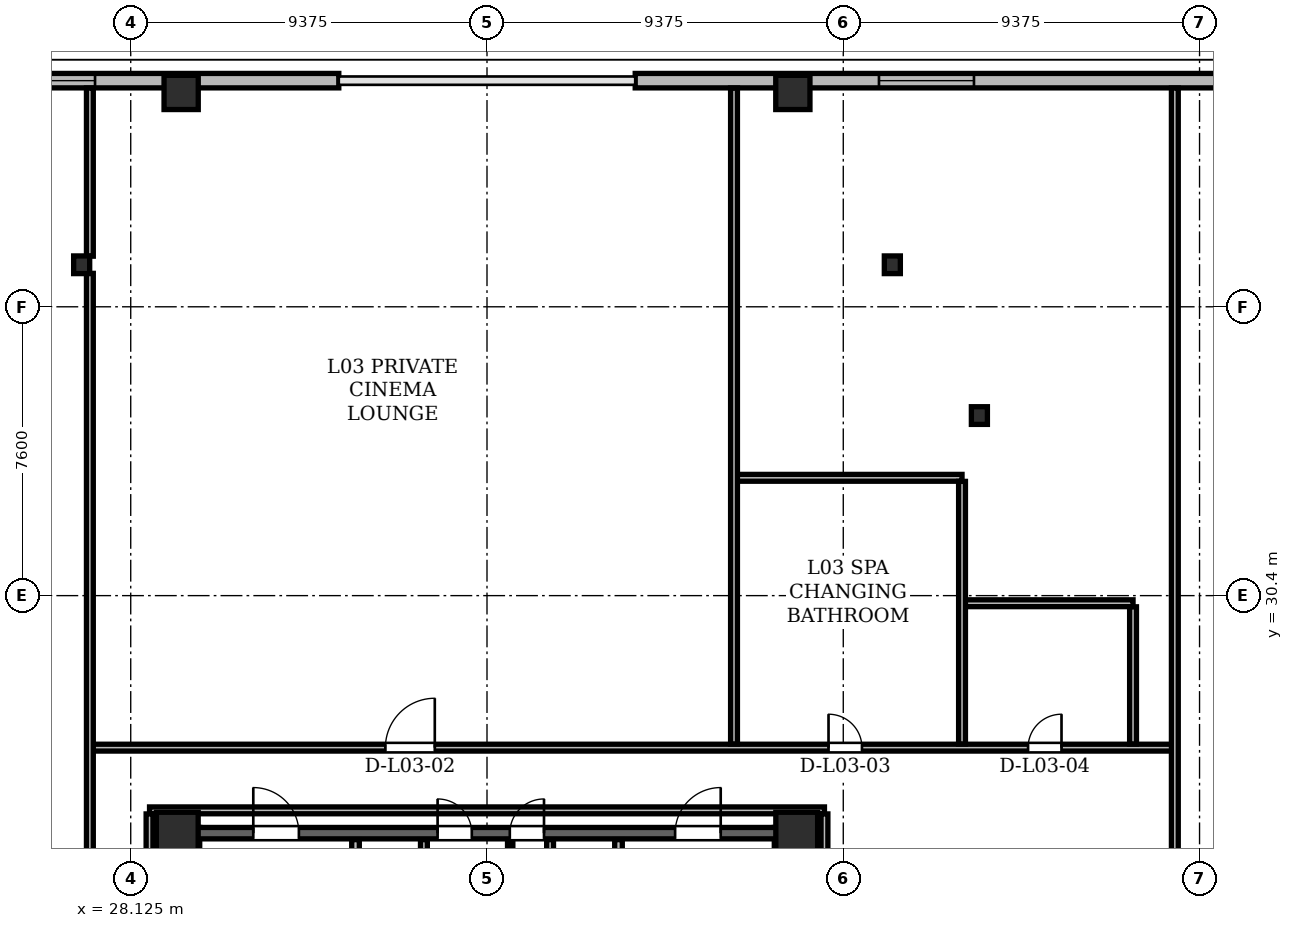
"""IFC4 building model, lengths in metres.
Left out: names, types, materials, properties, quantities, classifications, styles, units other than length and angle.
Written with IfcOpenShell. Run it as: python <this file> out.ifc"""

import sys

from ifc_helpers import new_model, si_unit, direction, frame, frame_2d, origin, origin_2d, place, context, subcontext, project, spatial, rectangle, hollow_rectangle, i_section, extrude, element, fill, save


model = new_model("IFC4")
c1 = context("Model", 3, precision=1e-05, world=origin(), true_north=direction((0.0, 1.0)))
c2 = subcontext(c1, "Body", "Model", "MODEL_VIEW")
j1 = project(units=[si_unit("LENGTHUNIT", "METRE"), si_unit("PLANEANGLEUNIT", "RADIAN")], contexts=[c1])
p1 = place(None, origin())
s1 = spatial("IfcSite", under=j1, at=p1, CompositionType="ELEMENT")
p2 = place(p1, origin())
s2 = spatial("IfcBuilding", under=s1, at=p2, CompositionType="ELEMENT")
p3 = place(p2, frame((0.0, 0.0, 14.1)))
s3 = spatial("IfcBuildingStorey", under=s2, at=p3, CompositionType="ELEMENT", Elevation=14.1)
for number, where, z_axis, x_axis in (
    (1, (45.65, 24.15, 0.0), (0.0, 0.0, 1.0), (1.0, 0.0, 0.0)),
    (2, (29.35, 24.15, 0.0), (0.0, 0.0, 1.0), (1.0, 0.0, 0.0)),
):
    element("IfcColumn", number, at=place(p3, frame(where, z_axis=z_axis, x_axis=x_axis)), inside=s3, PredefinedType="COLUMN", context=c2, shape_type="SweptSolid", body=[
        extrude(hollow_rectangle(XDim=1.1, YDim=1.1, WallThickness=0.09, at=origin_2d()), origin(), (0.0, 0.0, 1.0), 4.2),
    ])
for number, where, z_axis, x_axis in (
    (3, (45.548, 43.64, 0.004), (0.0, 0.0, 1.0), (1.0, 0.0, 0.0)),
    (4, (29.452, 43.64, 0.004), (0.0, 0.0, 1.0), (1.0, 0.0, 0.0)),
):
    element("IfcColumn", number, at=place(p3, frame(where, z_axis=z_axis, x_axis=x_axis)), inside=s3, PredefinedType="COLUMN", context=c2, shape_type="SweptSolid", body=[
        extrude(hollow_rectangle(XDim=0.9, YDim=0.9, WallThickness=0.075, at=origin_2d()), origin(), (0.0, 0.0, 1.0), 4.191),
    ])
for number, where, z_axis, x_axis in (
    (5, (50.457, 35.138, 0.004), (0.0, 0.0, 1.0), (1.0, 0.0, 0.0)),
    (6, (48.166, 39.106, 0.004), (0.0, 0.0, 1.0), (1.0, 0.0, 0.0)),
    (7, (26.834, 39.106, 0.004), (0.0, 0.0, 1.0), (1.0, 0.0, 0.0)),
):
    element("IfcColumn", number, at=place(p3, frame(where, z_axis=z_axis, x_axis=x_axis)), inside=s3, PredefinedType="COLUMN", context=c2, shape_type="SweptSolid", body=[
        extrude(i_section(OverallWidth=0.422, OverallDepth=0.465, WebThickness=0.045, FlangeThickness=0.072, at=origin_2d()), origin(), (0.0, 0.0, 1.0), 4.191),
    ])
for number, where, z_axis, x_axis in (
    (8, (29.64, 11.0, 0.0), (0.0, 0.0, 1.0), (0.0, 1.0, 0.0)),
    (9, (45.36, 11.0, 0.0), (0.0, 0.0, 1.0), (0.0, 1.0, 0.0)),
):
    element("IfcWall", number, at=place(p3, frame(where, z_axis=z_axis, x_axis=x_axis)), inside=s3, PredefinedType="SHEAR", context=c2, shape_type="SweptSolid", body=[
        extrude(rectangle(XDim=13.3, YDim=0.6, at=frame_2d((6.65, 0.0))), origin(), (0.0, 0.0, 1.0), 3.92),
    ])
p4 = place(p3, frame((29.65, 24.15, 0.0), z_axis=(0.0, 0.0, 1.0), x_axis=(1.0, 0.0, 0.0)))
e10 = element("IfcWall", 10, at=p4, inside=s3, PredefinedType="SHEAR", context=c2, shape_type="SweptSolid", body=[
    extrude(rectangle(XDim=15.7, YDim=0.3, at=frame_2d((7.85, 0.0))), origin(), (0.0, 0.0, 1.0), 3.92),
])
p5 = place(p4, frame((1.7, 0.0, 0.0)))
e11 = element("IfcOpeningElement", 11, at=p5, cuts=e10, PredefinedType="OPENING", context=c2, shape_type="SweptSolid", body=[
    extrude(rectangle(XDim=1.2, YDim=2.2, at=frame_2d((0.6, 1.1))), frame((0.0, 0.15, 0.0), z_axis=(0.0, -1.0, 0.0), x_axis=(1.0, 0.0, 0.0)), (0.0, 0.0, 1.0), 0.3),
])
p6 = place(p4, frame((12.8, 0.0, 0.0)))
e12 = element("IfcOpeningElement", 12, at=p6, cuts=e10, PredefinedType="OPENING", context=c2, shape_type="SweptSolid", body=[
    extrude(rectangle(XDim=1.2, YDim=2.2, at=frame_2d((0.6, 1.1))), frame((0.0, 0.15, 0.0), z_axis=(0.0, -1.0, 0.0), x_axis=(1.0, 0.0, 0.0)), (0.0, 0.0, 1.0), 0.3),
])
p7 = place(p4, frame((6.55, 0.0, 0.0)))
e13 = element("IfcOpeningElement", 13, at=p7, cuts=e10, PredefinedType="OPENING", context=c2, shape_type="SweptSolid", body=[
    extrude(rectangle(XDim=0.9, YDim=2.05, at=frame_2d((0.45, 1.025))), frame((0.0, 0.15, 0.0), z_axis=(0.0, -1.0, 0.0), x_axis=(1.0, 0.0, 0.0)), (0.0, 0.0, 1.0), 0.3),
])
p8 = place(p4, frame((8.45, 0.0, 0.0)))
e14 = element("IfcOpeningElement", 14, at=p8, cuts=e10, PredefinedType="OPENING", context=c2, shape_type="SweptSolid", body=[
    extrude(rectangle(XDim=0.9, YDim=2.05, at=frame_2d((0.45, 1.025))), frame((0.0, 0.15, 0.0), z_axis=(0.0, -1.0, 0.0), x_axis=(1.0, 0.0, 0.0)), (0.0, 0.0, 1.0), 0.3),
])
p9 = place(p3, frame((68.772, 43.95, 0.0), z_axis=(0.0, 0.0, 1.0), x_axis=(-1.0, 0.0, 0.0)))
e15 = element("IfcWall", 15, at=p9, inside=s3, PredefinedType="SOLIDWALL", context=c2, shape_type="SweptSolid", body=[
    extrude(rectangle(XDim=27.372, YDim=0.38, at=frame_2d((13.686, 0.0))), origin(), (0.0, 0.0, 1.0), 3.054),
])
p10 = place(p9, frame((6.414, 0.0, 0.85)))
e16 = element("IfcOpeningElement", 16, at=p10, cuts=e15, PredefinedType="OPENING", context=c2, shape_type="SweptSolid", body=[
    extrude(rectangle(XDim=2.5, YDim=2.034, at=frame_2d((1.25, 1.017))), frame((0.0, 0.19, 0.0), z_axis=(0.0, -1.0, 0.0), x_axis=(1.0, 0.0, 0.0)), (0.0, 0.0, 1.0), 0.38),
])
p11 = place(p9, frame((18.458, 0.0, 0.85)))
e17 = element("IfcOpeningElement", 17, at=p11, cuts=e15, PredefinedType="OPENING", context=c2, shape_type="SweptSolid", body=[
    extrude(rectangle(XDim=2.5, YDim=2.034, at=frame_2d((1.25, 1.017))), frame((0.0, 0.19, 0.0), z_axis=(0.0, -1.0, 0.0), x_axis=(1.0, 0.0, 0.0)), (0.0, 0.0, 1.0), 0.38),
])
p12 = place(p3, frame((33.6, 43.95, 0.0), z_axis=(0.0, 0.0, 1.0), x_axis=(-1.0, 0.0, 0.0)))
e18 = element("IfcWall", 18, at=p12, inside=s3, PredefinedType="SOLIDWALL", context=c2, shape_type="SweptSolid", body=[
    extrude(rectangle(XDim=27.372, YDim=0.38, at=frame_2d((13.686, 0.0))), origin(), (0.0, 0.0, 1.0), 3.054),
])
p13 = place(p12, frame((6.414, 0.0, 0.85)))
e19 = element("IfcOpeningElement", 19, at=p13, cuts=e18, PredefinedType="OPENING", context=c2, shape_type="SweptSolid", body=[
    extrude(rectangle(XDim=2.5, YDim=2.034, at=frame_2d((1.25, 1.017))), frame((0.0, 0.19, 0.0), z_axis=(0.0, -1.0, 0.0), x_axis=(1.0, 0.0, 0.0)), (0.0, 0.0, 1.0), 0.38),
])
p14 = place(p12, frame((18.458, 0.0, 0.85)))
e20 = element("IfcOpeningElement", 20, at=p14, cuts=e18, PredefinedType="OPENING", context=c2, shape_type="SweptSolid", body=[
    extrude(rectangle(XDim=2.5, YDim=2.034, at=frame_2d((1.25, 1.017))), frame((0.0, 0.19, 0.0), z_axis=(0.0, -1.0, 0.0), x_axis=(1.0, 0.0, 0.0)), (0.0, 0.0, 1.0), 0.38),
])
p15 = place(p3, frame((34.04, 19.48, 0.0), z_axis=(0.0, 0.0, 1.0), x_axis=(0.0, 1.0, 0.0)))
e21 = element("IfcWall", 21, at=p15, inside=s3, PredefinedType="PARTITIONING", context=c2, shape_type="SweptSolid", body=[
    extrude(rectangle(XDim=4.5, YDim=0.2, at=frame_2d((2.25, 0.0))), origin(), (0.0, 0.0, 1.0), 2.96),
])
p16 = place(p15, frame((2.12, 0.0, 0.0)))
e22 = element("IfcOpeningElement", 22, at=p16, cuts=e21, PredefinedType="OPENING", context=c2, shape_type="SweptSolid", body=[
    extrude(rectangle(XDim=1.1, YDim=2.2, at=frame_2d((0.55, 1.1))), frame((0.0, 0.1, 0.0), z_axis=(0.0, -1.0, 0.0), x_axis=(1.0, 0.0, 0.0)), (0.0, 0.0, 1.0), 0.2),
])
p17 = place(p3, frame((35.84, 20.96, 0.0), z_axis=(0.0, 0.0, 1.0), x_axis=(0.0, 1.0, 0.0)))
e23 = element("IfcWall", 23, at=p17, inside=s3, PredefinedType="PARTITIONING", context=c2, shape_type="SweptSolid", body=[
    extrude(rectangle(XDim=3.02, YDim=0.18, at=frame_2d((1.51, 0.0))), origin(), (0.0, 0.0, 1.0), 2.96),
])
p18 = place(p3, frame((40.96, 19.48, 0.0), z_axis=(0.0, 0.0, 1.0), x_axis=(0.0, 1.0, 0.0)))
e24 = element("IfcWall", 24, at=p18, inside=s3, PredefinedType="PARTITIONING", context=c2, shape_type="SweptSolid", body=[
    extrude(rectangle(XDim=4.5, YDim=0.2, at=frame_2d((2.25, 0.0))), origin(), (0.0, 0.0, 1.0), 2.96),
])
p19 = place(p18, frame((2.12, 0.0, 0.0)))
e25 = element("IfcOpeningElement", 25, at=p19, cuts=e24, PredefinedType="OPENING", context=c2, shape_type="SweptSolid", body=[
    extrude(rectangle(XDim=1.1, YDim=2.2, at=frame_2d((0.55, 1.1))), frame((0.0, 0.1, 0.0), z_axis=(0.0, -1.0, 0.0), x_axis=(1.0, 0.0, 0.0)), (0.0, 0.0, 1.0), 0.2),
])
p20 = place(p3, frame((39.16, 20.96, 0.0), z_axis=(0.0, 0.0, 1.0), x_axis=(0.0, 1.0, 0.0)))
e26 = element("IfcWall", 26, at=p20, inside=s3, PredefinedType="PARTITIONING", context=c2, shape_type="SweptSolid", body=[
    extrude(rectangle(XDim=3.02, YDim=0.18, at=frame_2d((1.51, 0.0))), origin(), (0.0, 0.0, 1.0), 2.96),
])
p21 = place(p3, frame((38.11, 21.06, 0.0), z_axis=(0.0, 0.0, 1.0), x_axis=(0.0, 1.0, 0.0)))
e27 = element("IfcWall", 27, at=p21, inside=s3, PredefinedType="PARTITIONING", context=c2, shape_type="SweptSolid", body=[
    extrude(rectangle(XDim=2.92, YDim=0.14, at=frame_2d((1.46, 0.0))), origin(), (0.0, 0.0, 1.0), 2.96),
])
p22 = place(p3, frame((28.62, 24.75, 0.0), z_axis=(0.0, 0.0, 1.0), x_axis=(1.0, 0.0, 0.0)))
e28 = element("IfcWall", 28, at=p22, inside=s3, PredefinedType="PARTITIONING", context=c2, shape_type="SweptSolid", body=[
    extrude(rectangle(XDim=17.76, YDim=0.18, at=frame_2d((8.88, 0.0))), origin(), (0.0, 0.0, 1.0), 2.983),
])
p23 = place(p3, frame((27.05, 26.4, 0.0), z_axis=(0.0, 0.0, 1.0), x_axis=(1.0, 0.0, 0.0)))
e29 = element("IfcWall", 29, at=p23, inside=s3, PredefinedType="PARTITIONING", context=c2, shape_type="SweptSolid", body=[
    extrude(rectangle(XDim=28.55, YDim=0.18, at=frame_2d((14.275, 0.0))), origin(), (0.0, 0.0, 1.0), 2.983),
])
p24 = place(p23, frame((7.776, 0.0, 0.0)))
e30 = element("IfcOpeningElement", 30, at=p24, cuts=e29, PredefinedType="OPENING", context=c2, shape_type="SweptSolid", body=[
    extrude(rectangle(XDim=1.3, YDim=2.2, at=frame_2d((0.65, 1.1))), frame((0.0, 0.09, 0.0), z_axis=(0.0, -1.0, 0.0), x_axis=(1.0, 0.0, 0.0)), (0.0, 0.0, 1.0), 0.18),
])
p25 = place(p23, frame((19.437, 0.0, 0.0)))
e31 = element("IfcOpeningElement", 31, at=p25, cuts=e29, PredefinedType="OPENING", context=c2, shape_type="SweptSolid", body=[
    extrude(rectangle(XDim=0.88, YDim=2.08, at=frame_2d((0.44, 1.04))), frame((0.0, 0.09, 0.0), z_axis=(0.0, -1.0, 0.0), x_axis=(1.0, 0.0, 0.0)), (0.0, 0.0, 1.0), 0.18),
])
p26 = place(p23, frame((24.688, 0.0, 0.0)))
e32 = element("IfcOpeningElement", 32, at=p26, cuts=e29, PredefinedType="OPENING", context=c2, shape_type="SweptSolid", body=[
    extrude(rectangle(XDim=0.88, YDim=2.08, at=frame_2d((0.44, 1.04))), frame((0.0, 0.09, 0.0), z_axis=(0.0, -1.0, 0.0), x_axis=(1.0, 0.0, 0.0)), (0.0, 0.0, 1.0), 0.18),
])
p27 = place(p3, frame((50.0, 30.2, 0.0), z_axis=(0.0, 0.0, 1.0), x_axis=(1.0, 0.0, 0.0)))
e33 = element("IfcWall", 33, at=p27, inside=s3, PredefinedType="PARTITIONING", context=c2, shape_type="SweptSolid", body=[
    extrude(rectangle(XDim=4.5, YDim=0.18, at=frame_2d((2.25, 0.0))), origin(), (0.0, 0.0, 1.0), 3.054),
])
p28 = place(p3, frame((44.0, 33.5, 0.0), z_axis=(0.0, 0.0, 1.0), x_axis=(1.0, 0.0, 0.0)))
e34 = element("IfcWall", 34, at=p28, inside=s3, PredefinedType="PARTITIONING", context=c2, shape_type="SweptSolid", body=[
    extrude(rectangle(XDim=6.0, YDim=0.18, at=frame_2d((3.0, 0.0))), origin(), (0.0, 0.0, 1.0), 2.983),
])
p29 = place(p3, frame((27.05, 10.494, 0.0), z_axis=(0.0, 0.0, 1.0), x_axis=(0.0, 1.0, 0.0)))
e35 = element("IfcWall", 35, at=p29, inside=s3, PredefinedType="PARTITIONING", context=c2, shape_type="SweptSolid", body=[
    extrude(rectangle(XDim=28.386, YDim=0.18, at=frame_2d((14.193, 0.0))), origin(), (0.0, 0.0, 1.0), 2.983),
])
p30 = place(p29, frame((5.985, 0.0, 0.0)))
e36 = element("IfcOpeningElement", 36, at=p30, cuts=e35, PredefinedType="OPENING", context=c2, shape_type="SweptSolid", body=[
    extrude(rectangle(XDim=1.3, YDim=2.2, at=frame_2d((0.65, 1.1))), frame((0.0, 0.09, 0.0), z_axis=(0.0, -1.0, 0.0), x_axis=(1.0, 0.0, 0.0)), (0.0, 0.0, 1.0), 0.18),
])
p31 = place(p3, frame((27.05, 39.332, 0.0), z_axis=(0.0, 0.0, 1.0), x_axis=(0.0, 1.0, 0.0)))
e37 = element("IfcWall", 37, at=p31, inside=s3, PredefinedType="PARTITIONING", context=c2, shape_type="SweptSolid", body=[
    extrude(rectangle(XDim=4.425, YDim=0.18, at=frame_2d((2.212, 0.0))), origin(), (0.0, 0.0, 1.0), 3.054),
])
p32 = place(p3, frame((28.62, 10.494, 0.0), z_axis=(0.0, 0.0, 1.0), x_axis=(0.0, 1.0, 0.0)))
e38 = element("IfcWall", 38, at=p32, inside=s3, PredefinedType="PARTITIONING", context=c2, shape_type="SweptSolid", body=[
    extrude(rectangle(XDim=14.162, YDim=0.18, at=frame_2d((7.081, 0.0))), origin(), (0.0, 0.0, 1.0), 2.983),
])
p33 = place(p3, frame((44.0, 26.494, 0.0), z_axis=(0.0, 0.0, 1.0), x_axis=(0.0, 1.0, 0.0)))
e39 = element("IfcWall", 39, at=p33, inside=s3, PredefinedType="PARTITIONING", context=c2, shape_type="SweptSolid", body=[
    extrude(rectangle(XDim=17.262, YDim=0.18, at=frame_2d((8.631, 0.0))), origin(), (0.0, 0.0, 1.0), 3.054),
])
p34 = place(p3, frame((46.38, 10.494, 0.0), z_axis=(0.0, 0.0, 1.0), x_axis=(0.0, 1.0, 0.0)))
e40 = element("IfcWall", 40, at=p34, inside=s3, PredefinedType="PARTITIONING", context=c2, shape_type="SweptSolid", body=[
    extrude(rectangle(XDim=14.162, YDim=0.18, at=frame_2d((7.081, 0.0))), origin(), (0.0, 0.0, 1.0), 3.92),
])
p35 = place(p3, frame((50.0, 26.494, 0.0), z_axis=(0.0, 0.0, 1.0), x_axis=(0.0, 1.0, 0.0)))
e41 = element("IfcWall", 41, at=p35, inside=s3, PredefinedType="PARTITIONING", context=c2, shape_type="SweptSolid", body=[
    extrude(rectangle(XDim=6.912, YDim=0.18, at=frame_2d((3.456, 0.0))), origin(), (0.0, 0.0, 1.0), 3.92),
])
p36 = place(p3, frame((54.5, 26.494, 0.0), z_axis=(0.0, 0.0, 1.0), x_axis=(0.0, 1.0, 0.0)))
e42 = element("IfcWall", 42, at=p36, inside=s3, PredefinedType="PARTITIONING", context=c2, shape_type="SweptSolid", body=[
    extrude(rectangle(XDim=3.612, YDim=0.18, at=frame_2d((1.806, 0.0))), origin(), (0.0, 0.0, 1.0), 3.054),
])
p37 = place(p3, frame((55.6, 18.889, 0.0), z_axis=(0.0, 0.0, 1.0), x_axis=(0.0, 1.0, 0.0)))
e43 = element("IfcWall", 43, at=p37, inside=s3, PredefinedType="PARTITIONING", context=c2, shape_type="SweptSolid", body=[
    extrude(rectangle(XDim=24.867, YDim=0.18, at=frame_2d((12.433, 0.0))), origin(), (0.0, 0.0, 1.0), 2.71),
])
p38 = place(p37, frame((2.356, 0.0, 0.0)))
e44 = element("IfcOpeningElement", 44, at=p38, cuts=e43, PredefinedType="OPENING", context=c2, shape_type="SweptSolid", body=[
    extrude(rectangle(XDim=1.3, YDim=2.2, at=frame_2d((0.65, 1.1))), frame((0.0, 0.09, 0.0), z_axis=(0.0, -1.0, 0.0), x_axis=(1.0, 0.0, 0.0)), (0.0, 0.0, 1.0), 0.18),
])
p39 = place(p11, origin())
e45 = element("IfcWindow", 45, at=p39, inside=s3, PartitioningType="SINGLE_PANEL", PredefinedType="WINDOW", context=c2, shape_type="SweptSolid", body=[
    extrude(rectangle(XDim=2.5, YDim=2.034, at=frame_2d((1.25, 1.017))), frame((0.0, 0.03, 0.0), z_axis=(0.0, -1.0, 0.0), x_axis=(1.0, 0.0, 0.0)), (0.0, 0.0, 1.0), 0.06),
])
fill(e17, e45)
p40 = place(p13, origin())
e46 = element("IfcWindow", 46, at=p40, inside=s3, PartitioningType="SINGLE_PANEL", PredefinedType="WINDOW", context=c2, shape_type="SweptSolid", body=[
    extrude(rectangle(XDim=2.5, YDim=2.034, at=frame_2d((1.25, 1.017))), frame((0.0, 0.03, 0.0), z_axis=(0.0, -1.0, 0.0), x_axis=(1.0, 0.0, 0.0)), (0.0, 0.0, 1.0), 0.06),
])
fill(e19, e46)
p41 = place(p5, origin())
e47 = element("IfcDoor", 47, at=p41, inside=s3, OperationType="SINGLE_SWING_LEFT", PredefinedType="DOOR", context=c2, shape_type="SweptSolid", body=[
    extrude(rectangle(XDim=1.2, YDim=2.2, at=frame_2d((0.6, 1.1))), frame((0.0, 0.025, 0.0), z_axis=(0.0, -1.0, 0.0), x_axis=(1.0, 0.0, 0.0)), (0.0, 0.0, 1.0), 0.05),
])
fill(e11, e47)
p42 = place(p6, origin())
e48 = element("IfcDoor", 48, at=p42, inside=s3, OperationType="SINGLE_SWING_RIGHT", PredefinedType="DOOR", context=c2, shape_type="SweptSolid", body=[
    extrude(rectangle(XDim=1.2, YDim=2.2, at=frame_2d((0.6, 1.1))), frame((0.0, 0.025, 0.0), z_axis=(0.0, -1.0, 0.0), x_axis=(1.0, 0.0, 0.0)), (0.0, 0.0, 1.0), 0.05),
])
fill(e12, e48)
p43 = place(p7, origin())
e49 = element("IfcDoor", 49, at=p43, inside=s3, OperationType="SINGLE_SWING_LEFT", PredefinedType="DOOR", context=c2, shape_type="SweptSolid", body=[
    extrude(rectangle(XDim=0.9, YDim=2.05, at=frame_2d((0.45, 1.025))), frame((0.0, 0.025, 0.0), z_axis=(0.0, -1.0, 0.0), x_axis=(1.0, 0.0, 0.0)), (0.0, 0.0, 1.0), 0.05),
])
fill(e13, e49)
p44 = place(p8, origin())
e50 = element("IfcDoor", 50, at=p44, inside=s3, OperationType="SINGLE_SWING_RIGHT", PredefinedType="DOOR", context=c2, shape_type="SweptSolid", body=[
    extrude(rectangle(XDim=0.9, YDim=2.05, at=frame_2d((0.45, 1.025))), frame((0.0, 0.025, 0.0), z_axis=(0.0, -1.0, 0.0), x_axis=(1.0, 0.0, 0.0)), (0.0, 0.0, 1.0), 0.05),
])
fill(e14, e50)
p45 = place(p24, origin())
e51 = element("IfcDoor", 51, at=p45, inside=s3, OperationType="SINGLE_SWING_RIGHT", PredefinedType="DOOR", context=c2, shape_type="SweptSolid", body=[
    extrude(rectangle(XDim=1.3, YDim=2.2, at=frame_2d((0.65, 1.1))), frame((0.0, 0.025, 0.0), z_axis=(0.0, -1.0, 0.0), x_axis=(1.0, 0.0, 0.0)), (0.0, 0.0, 1.0), 0.05),
])
fill(e30, e51)
p46 = place(p25, origin())
e52 = element("IfcDoor", 52, at=p46, inside=s3, OperationType="SINGLE_SWING_LEFT", PredefinedType="DOOR", context=c2, shape_type="SweptSolid", body=[
    extrude(rectangle(XDim=0.88, YDim=2.08, at=frame_2d((0.44, 1.04))), frame((0.0, 0.025, 0.0), z_axis=(0.0, -1.0, 0.0), x_axis=(1.0, 0.0, 0.0)), (0.0, 0.0, 1.0), 0.05),
])
fill(e31, e52)
p47 = place(p26, origin())
e53 = element("IfcDoor", 53, at=p47, inside=s3, OperationType="SINGLE_SWING_RIGHT", PredefinedType="DOOR", context=c2, shape_type="SweptSolid", body=[
    extrude(rectangle(XDim=0.88, YDim=2.08, at=frame_2d((0.44, 1.04))), frame((0.0, 0.025, 0.0), z_axis=(0.0, -1.0, 0.0), x_axis=(1.0, 0.0, 0.0)), (0.0, 0.0, 1.0), 0.05),
])
fill(e32, e53)
save(model, sys.argv[1])
